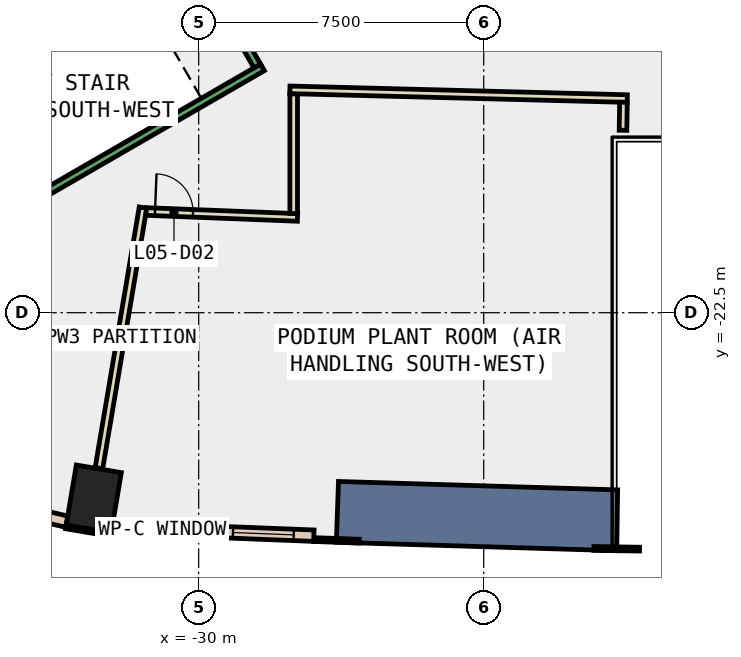
"""IFC4 building model, lengths in metres.
Left out: names, types, materials, properties, quantities, classifications, styles, units other than length and angle.
Written with IfcOpenShell. Run it as: python <this file> out.ifc"""

import sys

from ifc_helpers import new_model, si_unit, direction, frame, frame_2d, origin, origin_2d, place, context, subcontext, project, spatial, polyline, rectangle, outline, extrude, element, fill, save


model = new_model("IFC4")
c1 = context("Model", 3, precision=1e-05, world=origin(), true_north=direction((0.0, 1.0)))
c2 = subcontext(c1, "Body", "Model", "MODEL_VIEW")
j1 = project(units=[si_unit("LENGTHUNIT", "METRE"), si_unit("PLANEANGLEUNIT", "RADIAN")], contexts=[c1])
p1 = place(None, origin())
s1 = spatial("IfcSite", under=j1, at=p1, CompositionType="ELEMENT")
p2 = place(p1, origin())
s2 = spatial("IfcBuilding", under=s1, at=p2, CompositionType="ELEMENT")
p3 = place(p2, frame((0.0, 0.0, 30.0)))
s3 = spatial("IfcBuildingStorey", under=s2, at=p3, CompositionType="ELEMENT", Elevation=30.0)
p4 = place(p3, frame((-32.761, -27.397, -0.45), z_axis=(0.0, 0.0, 1.0), x_axis=(-0.98600476771, 0.166717119856, 0.0)))
e1 = element("IfcColumn", 1, at=p4, inside=s3, PredefinedType="COLUMN", context=c2, shape_type="SweptSolid", body=[
    extrude(rectangle(XDim=1.2, YDim=1.6, at=origin_2d()), origin(), (0.0, 0.0, 1.0), 4.85),
])
p5 = place(p3, frame((0.0, 0.0, -0.45)))
e2 = element("IfcWall", 2, at=p5, inside=s3, PredefinedType="SHEAR", context=c2, shape_type="SweptSolid", body=[
    extrude(outline(polyline([(-26.377, -28.54), (-19.0, -28.762), (-18.976, -27.162), (-26.321, -26.941), (-26.377, -28.54)])), origin(), (0.0, 0.0, 1.0), 4.85),
])
p6 = place(p3, frame((-33.494, -28.135, 0.0), z_axis=(0.0, 0.0, 1.0), x_axis=(0.986011774526, -0.166675674579, 0.0)))
e3 = element("IfcWall", 3, at=p6, inside=s3, PredefinedType="STANDARD", context=c2, shape_type="SweptSolid", body=[
    extrude(rectangle(XDim=1.2, YDim=0.1, at=frame_2d((0.6, 0.0))), origin(), (0.0, 0.0, 1.0), 4.4),
])
p7 = place(p3, frame((-26.975, -28.469, 0.0), z_axis=(0.0, 0.0, 1.0), x_axis=(0.999387493042, -0.034994838926, 0.0)))
e4 = element("IfcWall", 4, at=p7, inside=s3, PredefinedType="STANDARD", context=c2, shape_type="SweptSolid", body=[
    extrude(rectangle(XDim=1.2, YDim=0.1, at=frame_2d((0.6, 0.0))), origin(), (0.0, 0.0, 1.0), 4.4),
])
p8 = place(p3, frame((-19.599, -28.703, 0.0), z_axis=(0.0, 0.0, 1.0), x_axis=(0.999886724523, -0.015051183404, 0.0)))
e5 = element("IfcWall", 5, at=p8, inside=s3, PredefinedType="STANDARD", context=c2, shape_type="SweptSolid", body=[
    extrude(rectangle(XDim=1.2, YDim=0.1, at=frame_2d((0.6, 0.0))), origin(), (0.0, 0.0, 1.0), 4.4),
])
p9 = place(p3, frame((-32.282, -28.159, 0.0), z_axis=(0.0, 0.0, 1.0), x_axis=(0.999234205654, -0.039128023863, 0.0)))
e6 = element("IfcWall", 6, at=p9, inside=s3, PredefinedType="STANDARD", context=c2, shape_type="SweptSolid", body=[
    extrude(rectangle(XDim=5.316, YDim=0.3, at=frame_2d((2.658, 0.0))), origin(), (0.0, 0.0, 1.0), 4.4),
])
p10 = place(p9, frame((0.529, 0.0, 1.0)))
e7 = element("IfcOpeningElement", 7, at=p10, cuts=e6, PredefinedType="OPENING", context=c2, shape_type="SweptSolid", body=[
    extrude(rectangle(XDim=1.6, YDim=3.2, at=frame_2d((0.8, 1.6))), frame((0.0, 0.16, 0.0), z_axis=(0.0, -1.0, 0.0), x_axis=(1.0, 0.0, 0.0)), (0.0, 0.0, 1.0), 0.32),
])
p11 = place(p9, frame((3.187, 0.0, 1.0)))
e8 = element("IfcOpeningElement", 8, at=p11, cuts=e6, PredefinedType="OPENING", context=c2, shape_type="SweptSolid", body=[
    extrude(rectangle(XDim=1.6, YDim=3.2, at=frame_2d((0.8, 1.6))), frame((0.0, 0.16, 0.0), z_axis=(0.0, -1.0, 0.0), x_axis=(1.0, 0.0, 0.0)), (0.0, 0.0, 1.0), 0.32),
])
p12 = place(p3, frame((-36.923, -27.189, 0.0), z_axis=(0.0, 0.0, 1.0), x_axis=(0.97357041301, -0.228387063799, 0.0)))
e9 = element("IfcWall", 9, at=p12, inside=s3, PredefinedType="STANDARD", context=c2, shape_type="SweptSolid", body=[
    extrude(rectangle(XDim=3.547, YDim=0.3, at=frame_2d((1.773, 0.0))), origin(), (0.0, 0.0, 1.0), 4.4),
])
p13 = place(p12, frame((0.973, 0.0, 1.0)))
e10 = element("IfcOpeningElement", 10, at=p13, cuts=e9, PredefinedType="OPENING", context=c2, shape_type="SweptSolid", body=[
    extrude(rectangle(XDim=1.6, YDim=3.2, at=frame_2d((0.8, 1.6))), frame((0.0, 0.16, 0.0), z_axis=(0.0, -1.0, 0.0), x_axis=(1.0, 0.0, 0.0)), (0.0, 0.0, 1.0), 0.32),
])
p14 = place(p3, frame((-32.625, -26.588, 0.0), z_axis=(0.0, 0.0, 1.0), x_axis=(0.166858828969, 0.985980796565, 0.0)))
e11 = element("IfcWall", 11, at=p14, inside=s3, PredefinedType="PARTITIONING", context=c2, shape_type="SweptSolid", body=[
    extrude(rectangle(XDim=6.951, YDim=0.2, at=frame_2d((3.476, 0.0))), origin(), (0.0, 0.0, 1.0), 4.4),
])
p15 = place(p3, frame((-31.382, -19.837, 0.0), z_axis=(0.0, 0.0, 1.0), x_axis=(0.999233502058, -0.03914598785, 0.0)))
e12 = element("IfcWall", 12, at=p15, inside=s3, PredefinedType="PARTITIONING", context=c2, shape_type="SweptSolid", body=[
    extrude(rectangle(XDim=3.985, YDim=0.2, at=frame_2d((1.993, 0.0))), origin(), (0.0, 0.0, 1.0), 4.4),
])
p16 = place(p15, frame((0.233, 0.0, 0.0)))
e13 = element("IfcOpeningElement", 13, at=p16, cuts=e12, PredefinedType="OPENING", context=c2, shape_type="SweptSolid", body=[
    extrude(rectangle(XDim=1.0, YDim=2.1, at=frame_2d((0.5, 1.05))), frame((0.0, 0.11, 0.0), z_axis=(0.0, -1.0, 0.0), x_axis=(1.0, 0.0, 0.0)), (0.0, 0.0, 1.0), 0.22),
])
p17 = place(p3, frame((-27.5, -19.889, 0.0), z_axis=(0.0, 0.0, 1.0), x_axis=(0.0, 1.0, 0.0)))
e14 = element("IfcWall", 14, at=p17, inside=s3, PredefinedType="PARTITIONING", context=c2, shape_type="SweptSolid", body=[
    extrude(rectangle(XDim=3.15, YDim=0.2, at=frame_2d((1.575, 0.0))), origin(), (0.0, 0.0, 1.0), 4.4),
])
p18 = place(p3, frame((-27.6, -16.636, 0.0), z_axis=(0.0, 0.0, 1.0), x_axis=(0.999664659407, -0.025895341927, 0.0)))
e15 = element("IfcWall", 15, at=p18, inside=s3, PredefinedType="PARTITIONING", context=c2, shape_type="SweptSolid", body=[
    extrude(rectangle(XDim=8.881, YDim=0.2, at=frame_2d((4.44, 0.0))), origin(), (0.0, 0.0, 1.0), 4.4),
])
p19 = place(p3, frame((-18.823, -16.963, 0.0), z_axis=(0.0, 0.0, 1.0), x_axis=(-0.014903942317, -0.999888930083, 0.0)))
e16 = element("IfcWall", 16, at=p19, inside=s3, PredefinedType="PARTITIONING", context=c2, shape_type="SweptSolid", body=[
    extrude(rectangle(XDim=0.737, YDim=0.2, at=frame_2d((0.369, 0.0))), origin(), (0.0, 0.0, 1.0), 4.4),
])
for number, where, z_axis, x_axis in (
    (17, (-30.222, -12.755, 0.0), (0.0, 0.0, 1.0), (-0.866, -0.5, 0.0)),
    (18, (-28.322, -16.045, 0.0), (0.0, 0.0, 1.0), (-0.866, -0.5, 0.0)),
):
    element("IfcWall", number, at=place(p3, frame(where, z_axis=z_axis, x_axis=x_axis)), inside=s3, PredefinedType="STANDARD", context=c2, shape_type="SweptSolid", body=[
        extrude(rectangle(XDim=9.8, YDim=0.2, at=frame_2d((4.9, 0.0))), origin(), (0.0, 0.0, 1.0), 3.2),
    ])
p20 = place(p3, frame((-30.258, -12.891, 0.0), z_axis=(0.0, 0.0, 1.0), x_axis=(0.499982693035, -0.866035395735, 0.0)))
e19 = element("IfcWall", 19, at=p20, inside=s3, PredefinedType="STANDARD", context=c2, shape_type="SweptSolid", body=[
    extrude(rectangle(XDim=3.6, YDim=0.2, at=frame_2d((1.8, 0.0))), origin(), (0.0, 0.0, 1.0), 3.2),
])
p21 = place(p20, frame((1.2, 0.0, 0.0)))
e20 = element("IfcOpeningElement", 20, at=p21, cuts=e19, PredefinedType="OPENING", context=c2, shape_type="SweptSolid", body=[
    extrude(rectangle(XDim=1.2, YDim=2.2, at=frame_2d((0.6, 1.1))), frame((0.0, 0.11, 0.0), z_axis=(0.0, -1.0, 0.0), x_axis=(1.0, 0.0, 0.0)), (0.0, 0.0, 1.0), 0.22),
])
p22 = place(p10, origin())
e21 = element("IfcWindow", 21, at=p22, inside=s3, PartitioningType="SINGLE_PANEL", PredefinedType="WINDOW", context=c2, shape_type="SweptSolid", body=[
    extrude(rectangle(XDim=1.6, YDim=3.2, at=frame_2d((0.8, 1.6))), frame((0.0, 0.03, 0.0), z_axis=(0.0, -1.0, 0.0), x_axis=(1.0, 0.0, 0.0)), (0.0, 0.0, 1.0), 0.06),
])
fill(e7, e21)
p23 = place(p11, origin())
e22 = element("IfcWindow", 22, at=p23, inside=s3, PartitioningType="SINGLE_PANEL", PredefinedType="WINDOW", context=c2, shape_type="SweptSolid", body=[
    extrude(rectangle(XDim=1.6, YDim=3.2, at=frame_2d((0.8, 1.6))), frame((0.0, 0.03, 0.0), z_axis=(0.0, -1.0, 0.0), x_axis=(1.0, 0.0, 0.0)), (0.0, 0.0, 1.0), 0.06),
])
fill(e8, e22)
p24 = place(p16, origin())
e23 = element("IfcDoor", 23, at=p24, inside=s3, OperationType="SINGLE_SWING_LEFT", PredefinedType="DOOR", context=c2, shape_type="SweptSolid", body=[
    extrude(rectangle(XDim=1.0, YDim=2.1, at=frame_2d((0.5, 1.05))), frame((0.0, 0.025, 0.0), z_axis=(0.0, -1.0, 0.0), x_axis=(1.0, 0.0, 0.0)), (0.0, 0.0, 1.0), 0.05),
])
fill(e13, e23)
save(model, sys.argv[1])
